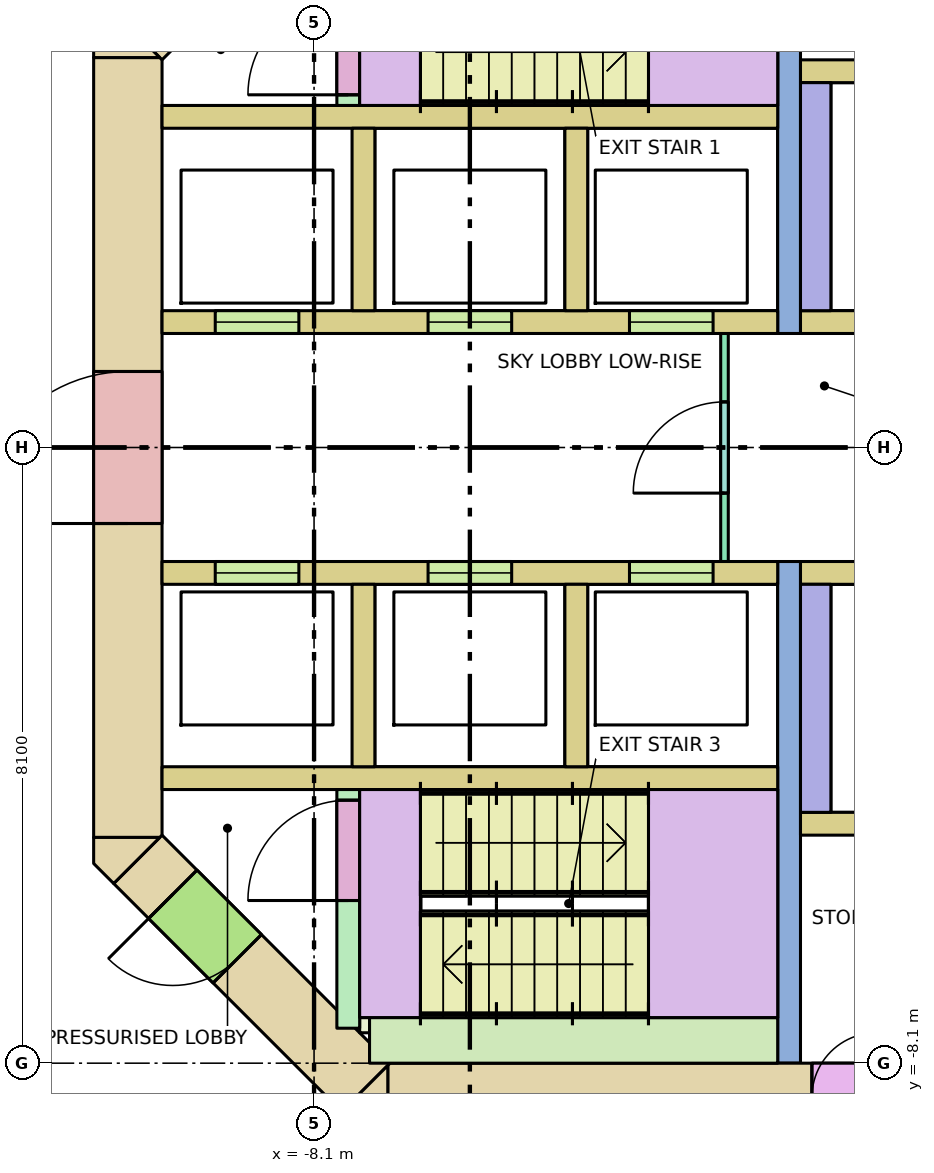
"""IFC4 building model, lengths in metres.
Left out: names, types, materials, properties, quantities, classifications, styles, units other than length and angle.
Written with IfcOpenShell. Run it as: python <this file> out.ifc"""

import sys

from ifc_helpers import new_model, si_unit, direction, frame, frame_2d, origin, place, context, subcontext, project, spatial, polyline, rectangle, outline, extrude, element, fill, save


model = new_model("IFC4")
c1 = context("Model", 3, precision=1e-05, world=origin(), true_north=direction((0.0, 1.0)))
c2 = subcontext(c1, "Body", "Model", "MODEL_VIEW")
j1 = project(units=[si_unit("LENGTHUNIT", "METRE"), si_unit("PLANEANGLEUNIT", "RADIAN")], contexts=[c1])
p1 = place(None, origin())
s1 = spatial("IfcSite", under=j1, at=p1, CompositionType="ELEMENT")
p2 = place(p1, origin())
s2 = spatial("IfcBuilding", under=s1, at=p2, CompositionType="ELEMENT")
p3 = place(p2, frame((0.0, 0.0, 146.6)))
s3 = spatial("IfcBuildingStorey", under=s2, at=p3, CompositionType="ELEMENT", Elevation=146.6)
p4 = place(p3, frame((-7.13, -8.55, -0.28), z_axis=(0.0, 0.0, 1.0), x_axis=(1.0, 0.0, 0.0)))
e1 = element("IfcWall", 1, at=p4, inside=s3, PredefinedType="SHEAR", context=c2, shape_type="SweptSolid", body=[
    extrude(rectangle(XDim=14.26, YDim=0.9, at=frame_2d((7.13, 0.0))), origin(), (0.0, 0.0, 1.0), 7.6),
])
p5 = place(p4, frame((8.08, 0.0, 0.28)))
e2 = element("IfcOpeningElement", 2, at=p5, cuts=e1, PredefinedType="OPENING", context=c2, shape_type="SweptSolid", body=[
    extrude(rectangle(XDim=0.7, YDim=2.1, at=frame_2d((0.35, 1.05))), frame((0.0, 0.46, 0.0), z_axis=(0.0, -1.0, 0.0), x_axis=(1.0, 0.0, 0.0)), (0.0, 0.0, 1.0), 0.92),
])
p6 = place(p4, frame((5.58, 0.0, 0.28)))
e3 = element("IfcOpeningElement", 3, at=p6, cuts=e1, PredefinedType="OPENING", context=c2, shape_type="SweptSolid", body=[
    extrude(rectangle(XDim=0.85, YDim=2.1, at=frame_2d((0.425, 1.05))), frame((0.0, 0.46, 0.0), z_axis=(0.0, -1.0, 0.0), x_axis=(1.0, 0.0, 0.0)), (0.0, 0.0, 1.0), 0.92),
])
p7 = place(p4, frame((6.88, 0.0, 0.28)))
e4 = element("IfcOpeningElement", 4, at=p7, cuts=e1, PredefinedType="OPENING", context=c2, shape_type="SweptSolid", body=[
    extrude(rectangle(XDim=0.85, YDim=2.1, at=frame_2d((0.425, 1.05))), frame((0.0, 0.46, 0.0), z_axis=(0.0, -1.0, 0.0), x_axis=(1.0, 0.0, 0.0)), (0.0, 0.0, 1.0), 0.92),
])
p8 = place(p4, frame((9.521, 0.0, 0.28)))
e5 = element("IfcOpeningElement", 5, at=p8, cuts=e1, PredefinedType="OPENING", context=c2, shape_type="SweptSolid", body=[
    extrude(rectangle(XDim=0.9, YDim=2.1, at=frame_2d((0.45, 1.05))), frame((0.0, 0.46, 0.0), z_axis=(0.0, -1.0, 0.0), x_axis=(1.0, 0.0, 0.0)), (0.0, 0.0, 1.0), 0.92),
])
p9 = place(p4, frame((11.278, 0.0, 0.28)))
e6 = element("IfcOpeningElement", 6, at=p9, cuts=e1, PredefinedType="OPENING", context=c2, shape_type="SweptSolid", body=[
    extrude(rectangle(XDim=0.9, YDim=2.1, at=frame_2d((0.45, 1.05))), frame((0.0, 0.46, 0.0), z_axis=(0.0, -1.0, 0.0), x_axis=(1.0, 0.0, 0.0)), (0.0, 0.0, 1.0), 0.92),
])
p10 = place(p4, frame((12.84, 0.0, 0.28)))
e7 = element("IfcOpeningElement", 7, at=p10, cuts=e1, PredefinedType="OPENING", context=c2, shape_type="SweptSolid", body=[
    extrude(rectangle(XDim=0.9, YDim=2.1, at=frame_2d((0.45, 1.05))), frame((0.0, 0.46, 0.0), z_axis=(0.0, -1.0, 0.0), x_axis=(1.0, 0.0, 0.0)), (0.0, 0.0, 1.0), 0.92),
])
p11 = place(p3, frame((-10.55, -5.13, -0.28), z_axis=(0.0, 0.0, 1.0), x_axis=(0.0, 1.0, 0.0)))
e8 = element("IfcWall", 8, at=p11, inside=s3, PredefinedType="SHEAR", context=c2, shape_type="SweptSolid", body=[
    extrude(rectangle(XDim=10.26, YDim=0.9, at=frame_2d((5.13, 0.0))), origin(), (0.0, 0.0, 1.0), 7.6),
])
p12 = place(p11, frame((4.13, 0.0, 0.28)))
e9 = element("IfcOpeningElement", 9, at=p12, cuts=e8, PredefinedType="OPENING", context=c2, shape_type="SweptSolid", body=[
    extrude(rectangle(XDim=2.0, YDim=2.1, at=frame_2d((1.0, 1.05))), frame((0.0, 0.46, 0.0), z_axis=(0.0, -1.0, 0.0), x_axis=(1.0, 0.0, 0.0)), (0.0, 0.0, 1.0), 0.92),
])
p13 = place(p3, frame((-10.418, 5.418, -0.28), z_axis=(0.0, 0.0, 1.0), x_axis=(0.707106781187, 0.707106781187, 0.0)))
e10 = element("IfcWall", 10, at=p13, inside=s3, PredefinedType="SHEAR", context=c2, shape_type="SweptSolid", body=[
    extrude(rectangle(XDim=4.243, YDim=0.9, at=frame_2d((2.121, 0.0))), origin(), (0.0, 0.0, 1.0), 7.6),
])
p14 = place(p13, frame((0.65, 0.0, 0.28)))
e11 = element("IfcOpeningElement", 11, at=p14, cuts=e10, PredefinedType="OPENING", context=c2, shape_type="SweptSolid", body=[
    extrude(rectangle(XDim=1.2, YDim=2.1, at=frame_2d((0.6, 1.05))), frame((0.0, 0.46, 0.0), z_axis=(0.0, -1.0, 0.0), x_axis=(1.0, 0.0, 0.0)), (0.0, 0.0, 1.0), 0.92),
])
p15 = place(p3, frame((-7.418, -8.418, -0.28), z_axis=(0.0, 0.0, 1.0), x_axis=(-0.707106781187, 0.707106781187, 0.0)))
e12 = element("IfcWall", 12, at=p15, inside=s3, PredefinedType="SHEAR", context=c2, shape_type="SweptSolid", body=[
    extrude(rectangle(XDim=4.243, YDim=0.9, at=frame_2d((2.121, 0.0))), origin(), (0.0, 0.0, 1.0), 7.6),
])
p16 = place(p15, frame((2.393, 0.0, 0.28)))
e13 = element("IfcOpeningElement", 13, at=p16, cuts=e12, PredefinedType="OPENING", context=c2, shape_type="SweptSolid", body=[
    extrude(rectangle(XDim=1.2, YDim=2.1, at=frame_2d((0.6, 1.05))), frame((0.0, 0.46, 0.0), z_axis=(0.0, -1.0, 0.0), x_axis=(1.0, 0.0, 0.0)), (0.0, 0.0, 1.0), 0.92),
])
p17 = place(p3, frame((0.0, 0.0, -0.28)))
e14 = element("IfcWall", 14, at=p17, inside=s3, PredefinedType="SHEAR", context=c2, shape_type="SweptSolid", body=[
    extrude(outline(polyline([(-7.473, -9.0), (-7.736, -8.736), (-7.13, -8.13), (-7.13, -9.0), (-7.473, -9.0)])), origin(), (0.0, 0.0, 1.0), 7.6),
])
p18 = place(p3, frame((0.0, 0.0, -0.28)))
e15 = element("IfcWall", 15, at=p18, inside=s3, PredefinedType="SHEAR", context=c2, shape_type="SweptSolid", body=[
    extrude(outline(polyline([(-11.0, -5.473), (-11.0, -5.13), (-10.13, -5.13), (-10.736, -5.736), (-11.0, -5.473)])), origin(), (0.0, 0.0, 1.0), 7.6),
])
p19 = place(p3, frame((0.0, 0.0, -0.28)))
e16 = element("IfcWall", 16, at=p19, inside=s3, PredefinedType="SHEAR", context=c2, shape_type="SweptSolid", body=[
    extrude(outline(polyline([(-10.736, 5.736), (-10.13, 5.13), (-11.0, 5.13), (-11.0, 5.473), (-10.736, 5.736)])), origin(), (0.0, 0.0, 1.0), 7.6),
])
for number, where, z_axis, x_axis in (
    (17, (-10.1, 4.35, 0.0), (0.0, 0.0, 1.0), (1.0, 0.0, 0.0)),
    (18, (-10.1, -4.35, 0.0), (0.0, 0.0, 1.0), (1.0, 0.0, 0.0)),
):
    element("IfcWall", number, at=place(p3, frame(where, z_axis=z_axis, x_axis=x_axis)), inside=s3, PredefinedType="SOLIDWALL", context=c2, shape_type="SweptSolid", body=[
        extrude(rectangle(XDim=8.1, YDim=0.3, at=frame_2d((4.05, 0.0))), origin(), (0.0, 0.0, 1.0), 7.32),
    ])
p20 = place(p3, frame((-10.1, 1.65, 0.0), z_axis=(0.0, 0.0, 1.0), x_axis=(1.0, 0.0, 0.0)))
e19 = element("IfcWall", 19, at=p20, inside=s3, PredefinedType="SOLIDWALL", context=c2, shape_type="SweptSolid", body=[
    extrude(rectangle(XDim=8.1, YDim=0.3, at=frame_2d((4.05, 0.0))), origin(), (0.0, 0.0, 1.0), 7.32),
])
p21 = place(p20, frame((0.7, 0.0, 0.0)))
e20 = element("IfcOpeningElement", 20, at=p21, cuts=e19, PredefinedType="OPENING", context=c2, shape_type="SweptSolid", body=[
    extrude(rectangle(XDim=1.1, YDim=2.1, at=frame_2d((0.55, 1.05))), frame((0.0, 0.16, 0.0), z_axis=(0.0, -1.0, 0.0), x_axis=(1.0, 0.0, 0.0)), (0.0, 0.0, 1.0), 0.32),
])
p22 = place(p20, frame((3.5, 0.0, 0.0)))
e21 = element("IfcOpeningElement", 21, at=p22, cuts=e19, PredefinedType="OPENING", context=c2, shape_type="SweptSolid", body=[
    extrude(rectangle(XDim=1.1, YDim=2.1, at=frame_2d((0.55, 1.05))), frame((0.0, 0.16, 0.0), z_axis=(0.0, -1.0, 0.0), x_axis=(1.0, 0.0, 0.0)), (0.0, 0.0, 1.0), 0.32),
])
p23 = place(p20, frame((6.15, 0.0, 0.0)))
e22 = element("IfcOpeningElement", 22, at=p23, cuts=e19, PredefinedType="OPENING", context=c2, shape_type="SweptSolid", body=[
    extrude(rectangle(XDim=1.1, YDim=2.1, at=frame_2d((0.55, 1.05))), frame((0.0, 0.16, 0.0), z_axis=(0.0, -1.0, 0.0), x_axis=(1.0, 0.0, 0.0)), (0.0, 0.0, 1.0), 0.32),
])
p24 = place(p3, frame((-10.1, -1.65, 0.0), z_axis=(0.0, 0.0, 1.0), x_axis=(1.0, 0.0, 0.0)))
e23 = element("IfcWall", 23, at=p24, inside=s3, PredefinedType="SOLIDWALL", context=c2, shape_type="SweptSolid", body=[
    extrude(rectangle(XDim=8.1, YDim=0.3, at=frame_2d((4.05, 0.0))), origin(), (0.0, 0.0, 1.0), 7.32),
])
p25 = place(p24, frame((0.7, 0.0, 0.0)))
e24 = element("IfcOpeningElement", 24, at=p25, cuts=e23, PredefinedType="OPENING", context=c2, shape_type="SweptSolid", body=[
    extrude(rectangle(XDim=1.1, YDim=2.1, at=frame_2d((0.55, 1.05))), frame((0.0, 0.16, 0.0), z_axis=(0.0, -1.0, 0.0), x_axis=(1.0, 0.0, 0.0)), (0.0, 0.0, 1.0), 0.32),
])
p26 = place(p24, frame((3.5, 0.0, 0.0)))
e25 = element("IfcOpeningElement", 25, at=p26, cuts=e23, PredefinedType="OPENING", context=c2, shape_type="SweptSolid", body=[
    extrude(rectangle(XDim=1.1, YDim=2.1, at=frame_2d((0.55, 1.05))), frame((0.0, 0.16, 0.0), z_axis=(0.0, -1.0, 0.0), x_axis=(1.0, 0.0, 0.0)), (0.0, 0.0, 1.0), 0.32),
])
p27 = place(p24, frame((6.15, 0.0, 0.0)))
e26 = element("IfcOpeningElement", 26, at=p27, cuts=e23, PredefinedType="OPENING", context=c2, shape_type="SweptSolid", body=[
    extrude(rectangle(XDim=1.1, YDim=2.1, at=frame_2d((0.55, 1.05))), frame((0.0, 0.16, 0.0), z_axis=(0.0, -1.0, 0.0), x_axis=(1.0, 0.0, 0.0)), (0.0, 0.0, 1.0), 0.32),
])
for number, where, z_axis, x_axis in (
    (27, (-7.45, 1.8, 0.0), (0.0, 0.0, 1.0), (0.0, 1.0, 0.0)),
    (28, (-7.45, -4.2, 0.0), (0.0, 0.0, 1.0), (0.0, 1.0, 0.0)),
    (29, (-4.65, 1.8, 0.0), (0.0, 0.0, 1.0), (0.0, 1.0, 0.0)),
    (30, (-4.65, -4.2, 0.0), (0.0, 0.0, 1.0), (0.0, 1.0, 0.0)),
):
    element("IfcWall", number, at=place(p3, frame(where, z_axis=z_axis, x_axis=x_axis)), inside=s3, PredefinedType="SOLIDWALL", context=c2, shape_type="SweptSolid", body=[
        extrude(rectangle(XDim=2.4, YDim=0.3, at=frame_2d((1.2, 0.0))), origin(), (0.0, 0.0, 1.0), 7.32),
    ])
for number, where, z_axis, x_axis in (
    (31, (-1.85, 1.5, 0.0), (0.0, 0.0, 1.0), (0.0, 1.0, 0.0)),
    (32, (-1.85, -8.1, 0.0), (0.0, 0.0, 1.0), (0.0, 1.0, 0.0)),
):
    element("IfcWall", number, at=place(p3, frame(where, z_axis=z_axis, x_axis=x_axis)), inside=s3, PredefinedType="SHEAR", context=c2, shape_type="SweptSolid", body=[
        extrude(rectangle(XDim=6.6, YDim=0.3, at=frame_2d((3.3, 0.0))), origin(), (0.0, 0.0, 1.0), 7.32),
    ])
p28 = place(p3, frame((-1.7, 1.65, 0.0), z_axis=(0.0, 0.0, 1.0), x_axis=(1.0, 0.0, 0.0)))
e33 = element("IfcWall", 33, at=p28, inside=s3, PredefinedType="SOLIDWALL", context=c2, shape_type="SweptSolid", body=[
    extrude(rectangle(XDim=3.4, YDim=0.3, at=frame_2d((1.7, 0.0))), origin(), (0.0, 0.0, 1.0), 7.32),
])
p29 = place(p28, frame((1.15, 0.0, 0.0)))
e34 = element("IfcOpeningElement", 34, at=p29, cuts=e33, PredefinedType="OPENING", context=c2, shape_type="SweptSolid", body=[
    extrude(rectangle(XDim=1.1, YDim=2.1, at=frame_2d((0.55, 1.05))), frame((0.0, 0.16, 0.0), z_axis=(0.0, -1.0, 0.0), x_axis=(1.0, 0.0, 0.0)), (0.0, 0.0, 1.0), 0.32),
])
p30 = place(p3, frame((-1.7, -1.65, 0.0), z_axis=(0.0, 0.0, 1.0), x_axis=(1.0, 0.0, 0.0)))
e35 = element("IfcWall", 35, at=p30, inside=s3, PredefinedType="SOLIDWALL", context=c2, shape_type="SweptSolid", body=[
    extrude(rectangle(XDim=3.4, YDim=0.3, at=frame_2d((1.7, 0.0))), origin(), (0.0, 0.0, 1.0), 7.32),
])
p31 = place(p30, frame((1.15, 0.0, 0.0)))
e36 = element("IfcOpeningElement", 36, at=p31, cuts=e35, PredefinedType="OPENING", context=c2, shape_type="SweptSolid", body=[
    extrude(rectangle(XDim=1.1, YDim=2.1, at=frame_2d((0.55, 1.05))), frame((0.0, 0.16, 0.0), z_axis=(0.0, -1.0, 0.0), x_axis=(1.0, 0.0, 0.0)), (0.0, 0.0, 1.0), 0.32),
])
for number, where, z_axis, x_axis in (
    (37, (-1.5, 1.8, 0.0), (0.0, 0.0, 1.0), (0.0, 1.0, 0.0)),
    (38, (-1.5, -4.8, 0.0), (0.0, 0.0, 1.0), (0.0, 1.0, 0.0)),
):
    element("IfcWall", number, at=place(p3, frame(where, z_axis=z_axis, x_axis=x_axis)), inside=s3, PredefinedType="SOLIDWALL", context=c2, shape_type="SweptSolid", body=[
        extrude(rectangle(XDim=3.0, YDim=0.4, at=frame_2d((1.5, 0.0))), origin(), (0.0, 0.0, 1.0), 7.32),
    ])
for number, where, z_axis, x_axis in (
    (39, (-1.7, 4.95, 0.0), (0.0, 0.0, 1.0), (1.0, 0.0, 0.0)),
    (40, (-1.7, -4.95, 0.0), (0.0, 0.0, 1.0), (1.0, 0.0, 0.0)),
):
    element("IfcWall", number, at=place(p3, frame(where, z_axis=z_axis, x_axis=x_axis)), inside=s3, PredefinedType="SOLIDWALL", context=c2, shape_type="SweptSolid", body=[
        extrude(rectangle(XDim=3.4, YDim=0.3, at=frame_2d((1.7, 0.0))), origin(), (0.0, 0.0, 1.0), 7.32),
    ])
p32 = place(p3, frame((-7.65, 4.5, 0.0), z_axis=(0.0, 0.0, 1.0), x_axis=(0.0, 1.0, 0.0)))
e41 = element("IfcWall", 41, at=p32, inside=s3, PredefinedType="SHEAR", context=c2, shape_type="SweptSolid", body=[
    extrude(rectangle(XDim=3.14, YDim=0.3, at=frame_2d((1.57, 0.0))), origin(), (0.0, 0.0, 1.0), 7.32),
])
p33 = place(p32, frame((0.14, 0.0, 0.0)))
e42 = element("IfcOpeningElement", 42, at=p33, cuts=e41, PredefinedType="OPENING", context=c2, shape_type="SweptSolid", body=[
    extrude(rectangle(XDim=1.32, YDim=2.1, at=frame_2d((0.66, 1.05))), frame((0.0, 0.16, 0.0), z_axis=(0.0, -1.0, 0.0), x_axis=(1.0, 0.0, 0.0)), (0.0, 0.0, 1.0), 0.32),
])
p34 = place(p3, frame((-7.65, -7.64, 0.0), z_axis=(0.0, 0.0, 1.0), x_axis=(0.0, 1.0, 0.0)))
e43 = element("IfcWall", 43, at=p34, inside=s3, PredefinedType="SHEAR", context=c2, shape_type="SweptSolid", body=[
    extrude(rectangle(XDim=3.14, YDim=0.3, at=frame_2d((1.57, 0.0))), origin(), (0.0, 0.0, 1.0), 7.32),
])
p35 = place(p34, frame((1.68, 0.0, 0.0)))
e44 = element("IfcOpeningElement", 44, at=p35, cuts=e43, PredefinedType="OPENING", context=c2, shape_type="SweptSolid", body=[
    extrude(rectangle(XDim=1.32, YDim=2.1, at=frame_2d((0.66, 1.05))), frame((0.0, 0.16, 0.0), z_axis=(0.0, -1.0, 0.0), x_axis=(1.0, 0.0, 0.0)), (0.0, 0.0, 1.0), 0.32),
])
p36 = place(p3, frame((-7.5, -7.6, 0.0), z_axis=(0.0, 0.0, 1.0), x_axis=(1.0, 0.0, 0.0)))
e45 = element("IfcWall", 45, at=p36, inside=s3, PredefinedType="SHEAR", context=c2, shape_type="SweptSolid", body=[
    extrude(rectangle(XDim=0.6, YDim=0.2, at=frame_2d((0.3, 0.0))), origin(), (0.0, 0.0, 1.0), 7.32),
])
p37 = place(p3, frame((-7.37, -7.8, 0.0), z_axis=(0.0, 0.0, 1.0), x_axis=(1.0, 0.0, 0.0)))
e46 = element("IfcWall", 46, at=p37, inside=s3, PredefinedType="SHEAR", context=c2, shape_type="SweptSolid", body=[
    extrude(rectangle(XDim=5.37, YDim=0.6, at=frame_2d((2.685, 0.0))), origin(), (0.0, 0.0, 1.0), 7.32),
])
p38 = place(p3, frame((-2.7, -1.5, 0.0), z_axis=(0.0, 0.0, 1.0), x_axis=(0.0, 1.0, 0.0)))
e47 = element("IfcWall", 47, at=p38, inside=s3, PredefinedType="PARTITIONING", context=c2, shape_type="SweptSolid", body=[
    extrude(rectangle(XDim=3.0, YDim=0.1, at=frame_2d((1.5, 0.0))), origin(), (0.0, 0.0, 1.0), 7.32),
])
p39 = place(p38, frame((0.9, 0.0, 0.0)))
e48 = element("IfcOpeningElement", 48, at=p39, cuts=e47, PredefinedType="OPENING", context=c2, shape_type="SweptSolid", body=[
    extrude(rectangle(XDim=1.2, YDim=2.1, at=frame_2d((0.6, 1.05))), frame((0.0, 0.06, 0.0), z_axis=(0.0, -1.0, 0.0), x_axis=(1.0, 0.0, 0.0)), (0.0, 0.0, 1.0), 0.12),
])
p40 = place(p3, frame((-9.281, -13.238, 0.0), z_axis=(0.0, 0.0, 1.0), x_axis=(-0.707106781187, 0.707106781187, 0.0)))
e49 = element("IfcWall", 49, at=p40, inside=s3, PredefinedType="PARTITIONING", context=c2, shape_type="SweptSolid", body=[
    extrude(rectangle(XDim=8.425, YDim=0.15, at=frame_2d((4.212, 0.0))), origin(), (0.0, 0.0, 1.0), 6.52),
])
p41 = place(p40, frame((3.312, 0.0, 0.0)))
e50 = element("IfcOpeningElement", 50, at=p41, cuts=e49, PredefinedType="OPENING", context=c2, shape_type="SweptSolid", body=[
    extrude(rectangle(XDim=1.8, YDim=2.1, at=frame_2d((0.9, 1.05))), frame((0.0, 0.085, 0.0), z_axis=(0.0, -1.0, 0.0), x_axis=(1.0, 0.0, 0.0)), (0.0, 0.0, 1.0), 0.17),
])
p42 = place(p21, origin())
e51 = element("IfcDoor", 51, at=p42, inside=s3, OperationType="DOUBLE_DOOR_SLIDING", PredefinedType="DOOR", context=c2, shape_type="SweptSolid", body=[
    extrude(rectangle(XDim=1.1, YDim=2.1, at=frame_2d((0.55, 1.05))), frame((0.0, 0.025, 0.0), z_axis=(0.0, -1.0, 0.0), x_axis=(1.0, 0.0, 0.0)), (0.0, 0.0, 1.0), 0.05),
])
fill(e20, e51)
p43 = place(p22, origin())
e52 = element("IfcDoor", 52, at=p43, inside=s3, OperationType="DOUBLE_DOOR_SLIDING", PredefinedType="DOOR", context=c2, shape_type="SweptSolid", body=[
    extrude(rectangle(XDim=1.1, YDim=2.1, at=frame_2d((0.55, 1.05))), frame((0.0, 0.025, 0.0), z_axis=(0.0, -1.0, 0.0), x_axis=(1.0, 0.0, 0.0)), (0.0, 0.0, 1.0), 0.05),
])
fill(e21, e52)
p44 = place(p23, origin())
e53 = element("IfcDoor", 53, at=p44, inside=s3, OperationType="DOUBLE_DOOR_SLIDING", PredefinedType="DOOR", context=c2, shape_type="SweptSolid", body=[
    extrude(rectangle(XDim=1.1, YDim=2.1, at=frame_2d((0.55, 1.05))), frame((0.0, 0.025, 0.0), z_axis=(0.0, -1.0, 0.0), x_axis=(1.0, 0.0, 0.0)), (0.0, 0.0, 1.0), 0.05),
])
fill(e22, e53)
p45 = place(p25, origin())
e54 = element("IfcDoor", 54, at=p45, inside=s3, OperationType="DOUBLE_DOOR_SLIDING", PredefinedType="DOOR", context=c2, shape_type="SweptSolid", body=[
    extrude(rectangle(XDim=1.1, YDim=2.1, at=frame_2d((0.55, 1.05))), frame((0.0, 0.025, 0.0), z_axis=(0.0, -1.0, 0.0), x_axis=(1.0, 0.0, 0.0)), (0.0, 0.0, 1.0), 0.05),
])
fill(e24, e54)
p46 = place(p26, origin())
e55 = element("IfcDoor", 55, at=p46, inside=s3, OperationType="DOUBLE_DOOR_SLIDING", PredefinedType="DOOR", context=c2, shape_type="SweptSolid", body=[
    extrude(rectangle(XDim=1.1, YDim=2.1, at=frame_2d((0.55, 1.05))), frame((0.0, 0.025, 0.0), z_axis=(0.0, -1.0, 0.0), x_axis=(1.0, 0.0, 0.0)), (0.0, 0.0, 1.0), 0.05),
])
fill(e25, e55)
p47 = place(p27, origin())
e56 = element("IfcDoor", 56, at=p47, inside=s3, OperationType="DOUBLE_DOOR_SLIDING", PredefinedType="DOOR", context=c2, shape_type="SweptSolid", body=[
    extrude(rectangle(XDim=1.1, YDim=2.1, at=frame_2d((0.55, 1.05))), frame((0.0, 0.025, 0.0), z_axis=(0.0, -1.0, 0.0), x_axis=(1.0, 0.0, 0.0)), (0.0, 0.0, 1.0), 0.05),
])
fill(e26, e56)
p48 = place(p33, origin())
e57 = element("IfcDoor", 57, at=p48, inside=s3, OperationType="DOUBLE_DOOR_SINGLE_SWING", PredefinedType="DOOR", context=c2, shape_type="SweptSolid", body=[
    extrude(rectangle(XDim=1.32, YDim=2.1, at=frame_2d((0.66, 1.05))), frame((0.0, 0.025, 0.0), z_axis=(0.0, -1.0, 0.0), x_axis=(1.0, 0.0, 0.0)), (0.0, 0.0, 1.0), 0.05),
])
fill(e42, e57)
p49 = place(p35, origin())
e58 = element("IfcDoor", 58, at=p49, inside=s3, OperationType="DOUBLE_DOOR_SINGLE_SWING", PredefinedType="DOOR", context=c2, shape_type="SweptSolid", body=[
    extrude(rectangle(XDim=1.32, YDim=2.1, at=frame_2d((0.66, 1.05))), frame((0.0, 0.025, 0.0), z_axis=(0.0, -1.0, 0.0), x_axis=(1.0, 0.0, 0.0)), (0.0, 0.0, 1.0), 0.05),
])
fill(e44, e58)
p50 = place(p16, origin())
e59 = element("IfcDoor", 59, at=p50, inside=s3, OperationType="SINGLE_SWING_RIGHT", PredefinedType="DOOR", context=c2, shape_type="SweptSolid", body=[
    extrude(rectangle(XDim=1.2, YDim=2.1, at=frame_2d((0.6, 1.05))), frame((0.0, 0.025, 0.0), z_axis=(0.0, -1.0, 0.0), x_axis=(1.0, 0.0, 0.0)), (0.0, 0.0, 1.0), 0.05),
])
fill(e13, e59)
p51 = place(p12, origin())
e60 = element("IfcDoor", 60, at=p51, inside=s3, OperationType="DOUBLE_DOOR_SINGLE_SWING", PredefinedType="DOOR", context=c2, shape_type="SweptSolid", body=[
    extrude(rectangle(XDim=2.0, YDim=2.1, at=frame_2d((1.0, 1.05))), frame((0.0, 0.025, 0.0), z_axis=(0.0, -1.0, 0.0), x_axis=(1.0, 0.0, 0.0)), (0.0, 0.0, 1.0), 0.05),
])
fill(e9, e60)
p52 = place(p39, origin())
e61 = element("IfcDoor", 61, at=p52, inside=s3, OperationType="SINGLE_SWING_LEFT", PredefinedType="DOOR", context=c2, shape_type="SweptSolid", body=[
    extrude(rectangle(XDim=1.2, YDim=2.1, at=frame_2d((0.6, 1.05))), frame((0.0, 0.025, 0.0), z_axis=(0.0, -1.0, 0.0), x_axis=(1.0, 0.0, 0.0)), (0.0, 0.0, 1.0), 0.05),
])
fill(e48, e61)
save(model, sys.argv[1])
